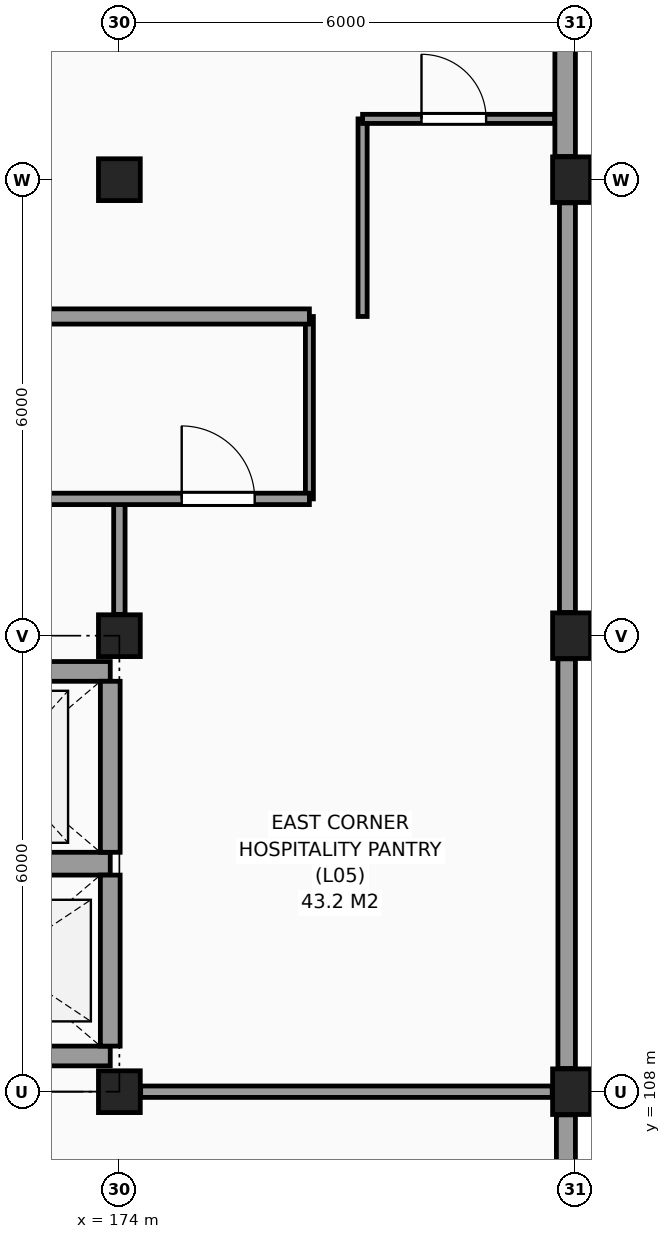
"""IFC4 building model, lengths in metres.
Left out: names, types, materials, properties, quantities, classifications, styles, units other than length and angle.
Written with IfcOpenShell. Run it as: python <this file> out.ifc"""

import sys

from ifc_helpers import new_model, si_unit, direction, frame, frame_2d, origin, origin_2d, place, context, subcontext, project, spatial, rectangle, extrude, element, fill, save


model = new_model("IFC4")
c1 = context("Model", 3, precision=1e-05, world=origin(), true_north=direction((0.0, 1.0)))
c2 = subcontext(c1, "Body", "Model", "MODEL_VIEW")
j1 = project(units=[si_unit("LENGTHUNIT", "METRE"), si_unit("PLANEANGLEUNIT", "RADIAN")], contexts=[c1])
p1 = place(None, origin())
s1 = spatial("IfcSite", under=j1, at=p1, CompositionType="ELEMENT")
p2 = place(p1, origin())
s2 = spatial("IfcBuilding", under=s1, at=p2, CompositionType="ELEMENT")
p3 = place(p2, frame((0.0, 0.0, 24.6)))
s3 = spatial("IfcBuildingStorey", under=s2, at=p3, CompositionType="ELEMENT", Elevation=24.6)
for number, where, z_axis, x_axis in (
    (1, (174.0, 108.0, 0.0), (0.0, 0.0, 1.0), (1.0, 0.0, 0.0)),
    (2, (174.0, 114.0, 0.0), (0.0, 0.0, 1.0), (1.0, 0.0, 0.0)),
    (3, (174.0, 120.0, 0.0), (0.0, 0.0, 1.0), (1.0, 0.0, 0.0)),
):
    element("IfcColumn", number, at=place(p3, frame(where, z_axis=z_axis, x_axis=x_axis)), inside=s3, PredefinedType="COLUMN", context=c2, shape_type="SweptSolid", body=[
        extrude(rectangle(XDim=0.55, YDim=0.55, at=origin_2d()), origin(), (0.0, 0.0, 1.0), 3.6),
    ])
for number, where, z_axis, x_axis in (
    (4, (180.0, 108.0, 0.0), (0.0, 0.0, 1.0), (1.0, 0.0, 0.0)),
    (5, (180.0, 114.0, 0.0), (0.0, 0.0, 1.0), (1.0, 0.0, 0.0)),
    (6, (180.0, 120.0, 0.0), (0.0, 0.0, 1.0), (1.0, 0.0, 0.0)),
):
    element("IfcColumn", number, at=place(p3, frame(where, z_axis=z_axis, x_axis=x_axis)), inside=s3, PredefinedType="COLUMN", context=c2, shape_type="SweptSolid", body=[
        extrude(rectangle(XDim=0.6, YDim=0.6, at=origin_2d()), origin(), (0.0, 0.0, 1.0), 3.6),
    ])
p4 = place(p3, frame((179.875, 102.305, 0.0), z_axis=(0.0, 0.0, 1.0), x_axis=(0.0, 1.0, 0.0)))
e7 = element("IfcWall", 7, at=p4, inside=s3, PredefinedType="SOLIDWALL", context=c2, shape_type="SweptSolid", body=[
    extrude(rectangle(XDim=5.39, YDim=0.25, at=frame_2d((2.695, 0.0))), origin(), (0.0, 0.0, 1.0), 2.73),
])
p5 = place(p4, frame((1.495, 0.0, 0.8)))
e8 = element("IfcOpeningElement", 8, at=p5, cuts=e7, PredefinedType="OPENING", context=c2, shape_type="SweptSolid", body=[
    extrude(rectangle(XDim=2.4, YDim=1.75, at=frame_2d((1.2, 0.875))), frame((0.0, 0.135, 0.0), z_axis=(0.0, -1.0, 0.0), x_axis=(1.0, 0.0, 0.0)), (0.0, 0.0, 1.0), 0.27),
])
p6 = place(p3, frame((179.885, 108.305, 0.0), z_axis=(0.0, 0.0, 1.0), x_axis=(0.0, 1.0, 0.0)))
e9 = element("IfcWall", 9, at=p6, inside=s3, PredefinedType="SOLIDWALL", context=c2, shape_type="SweptSolid", body=[
    extrude(rectangle(XDim=5.39, YDim=0.23, at=frame_2d((2.695, 0.0))), origin(), (0.0, 0.0, 1.0), 2.73),
])
p7 = place(p3, frame((179.895, 114.305, 0.0), z_axis=(0.0, 0.0, 1.0), x_axis=(0.0, 1.0, 0.0)))
e10 = element("IfcWall", 10, at=p7, inside=s3, PredefinedType="SOLIDWALL", context=c2, shape_type="SweptSolid", body=[
    extrude(rectangle(XDim=5.39, YDim=0.21, at=frame_2d((2.695, 0.0))), origin(), (0.0, 0.0, 1.0), 2.73),
])
p8 = place(p3, frame((179.865, 120.305, 0.0), z_axis=(0.0, 0.0, 1.0), x_axis=(0.0, 1.0, 0.0)))
e11 = element("IfcWall", 11, at=p8, inside=s3, PredefinedType="SOLIDWALL", context=c2, shape_type="SweptSolid", body=[
    extrude(rectangle(XDim=5.39, YDim=0.27, at=frame_2d((2.695, 0.0))), origin(), (0.0, 0.0, 1.0), 2.73),
])
p9 = place(p3, frame((170.97, 108.47, 0.0), z_axis=(0.0, 0.0, 1.0), x_axis=(1.0, 0.0, 0.0)))
e12 = element("IfcWall", 12, at=p9, inside=s3, PredefinedType="SHEAR", context=c2, shape_type="SweptSolid", body=[
    extrude(rectangle(XDim=2.91, YDim=0.26, at=frame_2d((1.455, 0.0))), origin(), (0.0, 0.0, 1.0), 3.6),
])
p10 = place(p3, frame((170.97, 111.0, 0.0), z_axis=(0.0, 0.0, 1.0), x_axis=(1.0, 0.0, 0.0)))
e13 = element("IfcWall", 13, at=p10, inside=s3, PredefinedType="SHEAR", context=c2, shape_type="SweptSolid", body=[
    extrude(rectangle(XDim=2.91, YDim=0.3, at=frame_2d((1.455, 0.0))), origin(), (0.0, 0.0, 1.0), 3.6),
])
p11 = place(p3, frame((173.88, 108.6, 0.0), z_axis=(0.0, 0.0, 1.0), x_axis=(0.0, 1.0, 0.0)))
e14 = element("IfcWall", 14, at=p11, inside=s3, PredefinedType="SHEAR", context=c2, shape_type="SweptSolid", body=[
    extrude(rectangle(XDim=2.25, YDim=0.26, at=frame_2d((1.125, 0.0))), origin(), (0.0, 0.0, 1.0), 3.6),
])
p12 = place(p3, frame((170.97, 113.53, 0.0), z_axis=(0.0, 0.0, 1.0), x_axis=(1.0, 0.0, 0.0)))
e15 = element("IfcWall", 15, at=p12, inside=s3, PredefinedType="SHEAR", context=c2, shape_type="SweptSolid", body=[
    extrude(rectangle(XDim=2.91, YDim=0.26, at=frame_2d((1.455, 0.0))), origin(), (0.0, 0.0, 1.0), 3.6),
])
p13 = place(p3, frame((173.88, 111.15, 0.0), z_axis=(0.0, 0.0, 1.0), x_axis=(0.0, 1.0, 0.0)))
e16 = element("IfcWall", 16, at=p13, inside=s3, PredefinedType="SHEAR", context=c2, shape_type="SweptSolid", body=[
    extrude(rectangle(XDim=2.25, YDim=0.26, at=frame_2d((1.125, 0.0))), origin(), (0.0, 0.0, 1.0), 3.6),
])
p14 = place(p3, frame((174.0, 114.28, 0.0), z_axis=(0.0, 0.0, 1.0), x_axis=(0.0, 1.0, 0.0)))
e17 = element("IfcWall", 17, at=p14, inside=s3, PredefinedType="PARTITIONING", context=c2, shape_type="SweptSolid", body=[
    extrude(rectangle(XDim=1.52, YDim=0.15, at=frame_2d((0.76, 0.0))), origin(), (0.0, 0.0, 1.0), 2.58),
])
p15 = place(p3, frame((176.5, 115.8, 0.0), z_axis=(0.0, 0.0, 1.0), x_axis=(0.0, 1.0, 0.0)))
e18 = element("IfcWall", 18, at=p15, inside=s3, PredefinedType="PARTITIONING", context=c2, shape_type="SweptSolid", body=[
    extrude(rectangle(XDim=2.4, YDim=0.105, at=frame_2d((1.2, 0.0))), origin(), (0.0, 0.0, 1.0), 3.38),
])
p16 = place(p3, frame((177.2, 118.2, 0.0), z_axis=(0.0, 0.0, 1.0), x_axis=(0.0, 1.0, 0.0)))
e19 = element("IfcWall", 19, at=p16, inside=s3, PredefinedType="PARTITIONING", context=c2, shape_type="SweptSolid", body=[
    extrude(rectangle(XDim=2.6, YDim=0.12, at=frame_2d((1.3, 0.0))), origin(), (0.0, 0.0, 1.0), 3.38),
])
p17 = place(p3, frame((174.28, 108.0, 0.0), z_axis=(0.0, 0.0, 1.0), x_axis=(1.0, 0.0, 0.0)))
e20 = element("IfcWall", 20, at=p17, inside=s3, PredefinedType="PARTITIONING", context=c2, shape_type="SweptSolid", body=[
    extrude(rectangle(XDim=5.415, YDim=0.15, at=frame_2d((2.708, 0.0))), origin(), (0.0, 0.0, 1.0), 2.58),
])
p18 = place(p3, frame((172.2, 115.8, 0.0), z_axis=(0.0, 0.0, 1.0), x_axis=(1.0, 0.0, 0.0)))
e21 = element("IfcWall", 21, at=p18, inside=s3, PredefinedType="PARTITIONING", context=c2, shape_type="SweptSolid", body=[
    extrude(rectangle(XDim=4.3, YDim=0.15, at=frame_2d((2.15, 0.0))), origin(), (0.0, 0.0, 1.0), 3.38),
])
p19 = place(p18, frame((2.62, 0.0, 0.0)))
e22 = element("IfcOpeningElement", 22, at=p19, cuts=e21, PredefinedType="OPENING", context=c2, shape_type="SweptSolid", body=[
    extrude(rectangle(XDim=0.96, YDim=2.15, at=frame_2d((0.48, 1.075))), frame((0.0, 0.085, 0.0), z_axis=(0.0, -1.0, 0.0), x_axis=(1.0, 0.0, 0.0)), (0.0, 0.0, 1.0), 0.17),
])
p20 = place(p3, frame((66.255, 118.2, 0.0), z_axis=(0.0, 0.0, 1.0), x_axis=(1.0, 0.0, 0.0)))
e23 = element("IfcWall", 23, at=p20, inside=s3, PredefinedType="PARTITIONING", context=c2, shape_type="SweptSolid", body=[
    extrude(rectangle(XDim=110.245, YDim=0.2, at=frame_2d((55.123, 0.0))), origin(), (0.0, 0.0, 1.0), 3.38),
])
p21 = place(p20, frame((7.57, 0.0, 0.0)))
e24 = element("IfcOpeningElement", 24, at=p21, cuts=e23, PredefinedType="OPENING", context=c2, shape_type="SweptSolid", body=[
    extrude(rectangle(XDim=0.95, YDim=2.1, at=frame_2d((0.475, 1.05))), frame((0.0, 0.11, 0.0), z_axis=(0.0, -1.0, 0.0), x_axis=(1.0, 0.0, 0.0)), (0.0, 0.0, 1.0), 0.22),
])
p22 = place(p20, frame((12.07, 0.0, 0.0)))
e25 = element("IfcOpeningElement", 25, at=p22, cuts=e23, PredefinedType="OPENING", context=c2, shape_type="SweptSolid", body=[
    extrude(rectangle(XDim=0.95, YDim=2.1, at=frame_2d((0.475, 1.05))), frame((0.0, 0.11, 0.0), z_axis=(0.0, -1.0, 0.0), x_axis=(1.0, 0.0, 0.0)), (0.0, 0.0, 1.0), 0.22),
])
p23 = place(p20, frame((16.27, 0.0, 0.0)))
e26 = element("IfcOpeningElement", 26, at=p23, cuts=e23, PredefinedType="OPENING", context=c2, shape_type="SweptSolid", body=[
    extrude(rectangle(XDim=0.95, YDim=2.1, at=frame_2d((0.475, 1.05))), frame((0.0, 0.11, 0.0), z_axis=(0.0, -1.0, 0.0), x_axis=(1.0, 0.0, 0.0)), (0.0, 0.0, 1.0), 0.22),
])
p24 = place(p20, frame((18.47, 0.0, 0.0)))
e27 = element("IfcOpeningElement", 27, at=p24, cuts=e23, PredefinedType="OPENING", context=c2, shape_type="SweptSolid", body=[
    extrude(rectangle(XDim=0.95, YDim=2.1, at=frame_2d((0.475, 1.05))), frame((0.0, 0.11, 0.0), z_axis=(0.0, -1.0, 0.0), x_axis=(1.0, 0.0, 0.0)), (0.0, 0.0, 1.0), 0.22),
])
p25 = place(p20, frame((32.32, 0.0, 0.0)))
e28 = element("IfcOpeningElement", 28, at=p25, cuts=e23, PredefinedType="OPENING", context=c2, shape_type="SweptSolid", body=[
    extrude(rectangle(XDim=0.95, YDim=2.1, at=frame_2d((0.475, 1.05))), frame((0.0, 0.11, 0.0), z_axis=(0.0, -1.0, 0.0), x_axis=(1.0, 0.0, 0.0)), (0.0, 0.0, 1.0), 0.22),
])
p26 = place(p20, frame((36.47, 0.0, 0.0)))
e29 = element("IfcOpeningElement", 29, at=p26, cuts=e23, PredefinedType="OPENING", context=c2, shape_type="SweptSolid", body=[
    extrude(rectangle(XDim=0.95, YDim=2.1, at=frame_2d((0.475, 1.05))), frame((0.0, 0.11, 0.0), z_axis=(0.0, -1.0, 0.0), x_axis=(1.0, 0.0, 0.0)), (0.0, 0.0, 1.0), 0.22),
])
p27 = place(p20, frame((46.27, 0.0, 0.0)))
e30 = element("IfcOpeningElement", 30, at=p27, cuts=e23, PredefinedType="OPENING", context=c2, shape_type="SweptSolid", body=[
    extrude(rectangle(XDim=0.95, YDim=2.1, at=frame_2d((0.475, 1.05))), frame((0.0, 0.11, 0.0), z_axis=(0.0, -1.0, 0.0), x_axis=(1.0, 0.0, 0.0)), (0.0, 0.0, 1.0), 0.22),
])
p28 = place(p20, frame((48.47, 0.0, 0.0)))
e31 = element("IfcOpeningElement", 31, at=p28, cuts=e23, PredefinedType="OPENING", context=c2, shape_type="SweptSolid", body=[
    extrude(rectangle(XDim=0.95, YDim=2.1, at=frame_2d((0.475, 1.05))), frame((0.0, 0.11, 0.0), z_axis=(0.0, -1.0, 0.0), x_axis=(1.0, 0.0, 0.0)), (0.0, 0.0, 1.0), 0.22),
])
p29 = place(p20, frame((52.87, 0.0, 0.0)))
e32 = element("IfcOpeningElement", 32, at=p29, cuts=e23, PredefinedType="OPENING", context=c2, shape_type="SweptSolid", body=[
    extrude(rectangle(XDim=0.95, YDim=2.1, at=frame_2d((0.475, 1.05))), frame((0.0, 0.11, 0.0), z_axis=(0.0, -1.0, 0.0), x_axis=(1.0, 0.0, 0.0)), (0.0, 0.0, 1.0), 0.22),
])
p30 = place(p20, frame((60.07, 0.0, 0.0)))
e33 = element("IfcOpeningElement", 33, at=p30, cuts=e23, PredefinedType="OPENING", context=c2, shape_type="SweptSolid", body=[
    extrude(rectangle(XDim=0.95, YDim=2.1, at=frame_2d((0.475, 1.05))), frame((0.0, 0.11, 0.0), z_axis=(0.0, -1.0, 0.0), x_axis=(1.0, 0.0, 0.0)), (0.0, 0.0, 1.0), 0.22),
])
p31 = place(p20, frame((68.32, 0.0, 0.0)))
e34 = element("IfcOpeningElement", 34, at=p31, cuts=e23, PredefinedType="OPENING", context=c2, shape_type="SweptSolid", body=[
    extrude(rectangle(XDim=0.95, YDim=2.1, at=frame_2d((0.475, 1.05))), frame((0.0, 0.11, 0.0), z_axis=(0.0, -1.0, 0.0), x_axis=(1.0, 0.0, 0.0)), (0.0, 0.0, 1.0), 0.22),
])
p32 = place(p20, frame((80.32, 0.0, 0.0)))
e35 = element("IfcOpeningElement", 35, at=p32, cuts=e23, PredefinedType="OPENING", context=c2, shape_type="SweptSolid", body=[
    extrude(rectangle(XDim=0.95, YDim=2.1, at=frame_2d((0.475, 1.05))), frame((0.0, 0.11, 0.0), z_axis=(0.0, -1.0, 0.0), x_axis=(1.0, 0.0, 0.0)), (0.0, 0.0, 1.0), 0.22),
])
p33 = place(p20, frame((82.87, 0.0, 0.0)))
e36 = element("IfcOpeningElement", 36, at=p33, cuts=e23, PredefinedType="OPENING", context=c2, shape_type="SweptSolid", body=[
    extrude(rectangle(XDim=0.95, YDim=2.1, at=frame_2d((0.475, 1.05))), frame((0.0, 0.11, 0.0), z_axis=(0.0, -1.0, 0.0), x_axis=(1.0, 0.0, 0.0)), (0.0, 0.0, 1.0), 0.22),
])
p34 = place(p20, frame((90.07, 0.0, 0.0)))
e37 = element("IfcOpeningElement", 37, at=p34, cuts=e23, PredefinedType="OPENING", context=c2, shape_type="SweptSolid", body=[
    extrude(rectangle(XDim=0.95, YDim=2.1, at=frame_2d((0.475, 1.05))), frame((0.0, 0.11, 0.0), z_axis=(0.0, -1.0, 0.0), x_axis=(1.0, 0.0, 0.0)), (0.0, 0.0, 1.0), 0.22),
])
p35 = place(p20, frame((94.27, 0.0, 0.0)))
e38 = element("IfcOpeningElement", 38, at=p35, cuts=e23, PredefinedType="OPENING", context=c2, shape_type="SweptSolid", body=[
    extrude(rectangle(XDim=0.95, YDim=2.1, at=frame_2d((0.475, 1.05))), frame((0.0, 0.11, 0.0), z_axis=(0.0, -1.0, 0.0), x_axis=(1.0, 0.0, 0.0)), (0.0, 0.0, 1.0), 0.22),
])
p36 = place(p20, frame((103.57, 0.0, 0.0)))
e39 = element("IfcOpeningElement", 39, at=p36, cuts=e23, PredefinedType="OPENING", context=c2, shape_type="SweptSolid", body=[
    extrude(rectangle(XDim=0.95, YDim=2.1, at=frame_2d((0.475, 1.05))), frame((0.0, 0.11, 0.0), z_axis=(0.0, -1.0, 0.0), x_axis=(1.0, 0.0, 0.0)), (0.0, 0.0, 1.0), 0.22),
])
p37 = place(p20, frame((104.97, 0.0, 0.0)))
e40 = element("IfcOpeningElement", 40, at=p37, cuts=e23, PredefinedType="OPENING", context=c2, shape_type="SweptSolid", body=[
    extrude(rectangle(XDim=0.95, YDim=2.1, at=frame_2d((0.475, 1.05))), frame((0.0, 0.11, 0.0), z_axis=(0.0, -1.0, 0.0), x_axis=(1.0, 0.0, 0.0)), (0.0, 0.0, 1.0), 0.22),
])
p38 = place(p3, frame((177.2, 120.8, 0.0), z_axis=(0.0, 0.0, 1.0), x_axis=(1.0, 0.0, 0.0)))
e41 = element("IfcWall", 41, at=p38, inside=s3, PredefinedType="PARTITIONING", context=c2, shape_type="SweptSolid", body=[
    extrude(rectangle(XDim=2.525, YDim=0.12, at=frame_2d((1.263, 0.0))), origin(), (0.0, 0.0, 1.0), 3.38),
])
p39 = place(p38, frame((0.775, 0.0, 0.0)))
e42 = element("IfcOpeningElement", 42, at=p39, cuts=e41, PredefinedType="OPENING", context=c2, shape_type="SweptSolid", body=[
    extrude(rectangle(XDim=0.85, YDim=2.1, at=frame_2d((0.425, 1.05))), frame((0.0, 0.07, 0.0), z_axis=(0.0, -1.0, 0.0), x_axis=(1.0, 0.0, 0.0)), (0.0, 0.0, 1.0), 0.14),
])
p40 = place(p39, origin())
e43 = element("IfcDoor", 43, at=p40, inside=s3, OperationType="SINGLE_SWING_LEFT", PredefinedType="DOOR", context=c2, shape_type="SweptSolid", body=[
    extrude(rectangle(XDim=0.85, YDim=2.1, at=frame_2d((0.425, 1.05))), frame((0.0, 0.025, 0.0), z_axis=(0.0, -1.0, 0.0), x_axis=(1.0, 0.0, 0.0)), (0.0, 0.0, 1.0), 0.05),
])
fill(e42, e43)
p41 = place(p19, origin())
e44 = element("IfcDoor", 44, at=p41, inside=s3, OperationType="SINGLE_SWING_LEFT", PredefinedType="DOOR", context=c2, shape_type="SweptSolid", body=[
    extrude(rectangle(XDim=0.96, YDim=2.15, at=frame_2d((0.48, 1.075))), frame((0.0, 0.025, 0.0), z_axis=(0.0, -1.0, 0.0), x_axis=(1.0, 0.0, 0.0)), (0.0, 0.0, 1.0), 0.05),
])
fill(e22, e44)
save(model, sys.argv[1])
